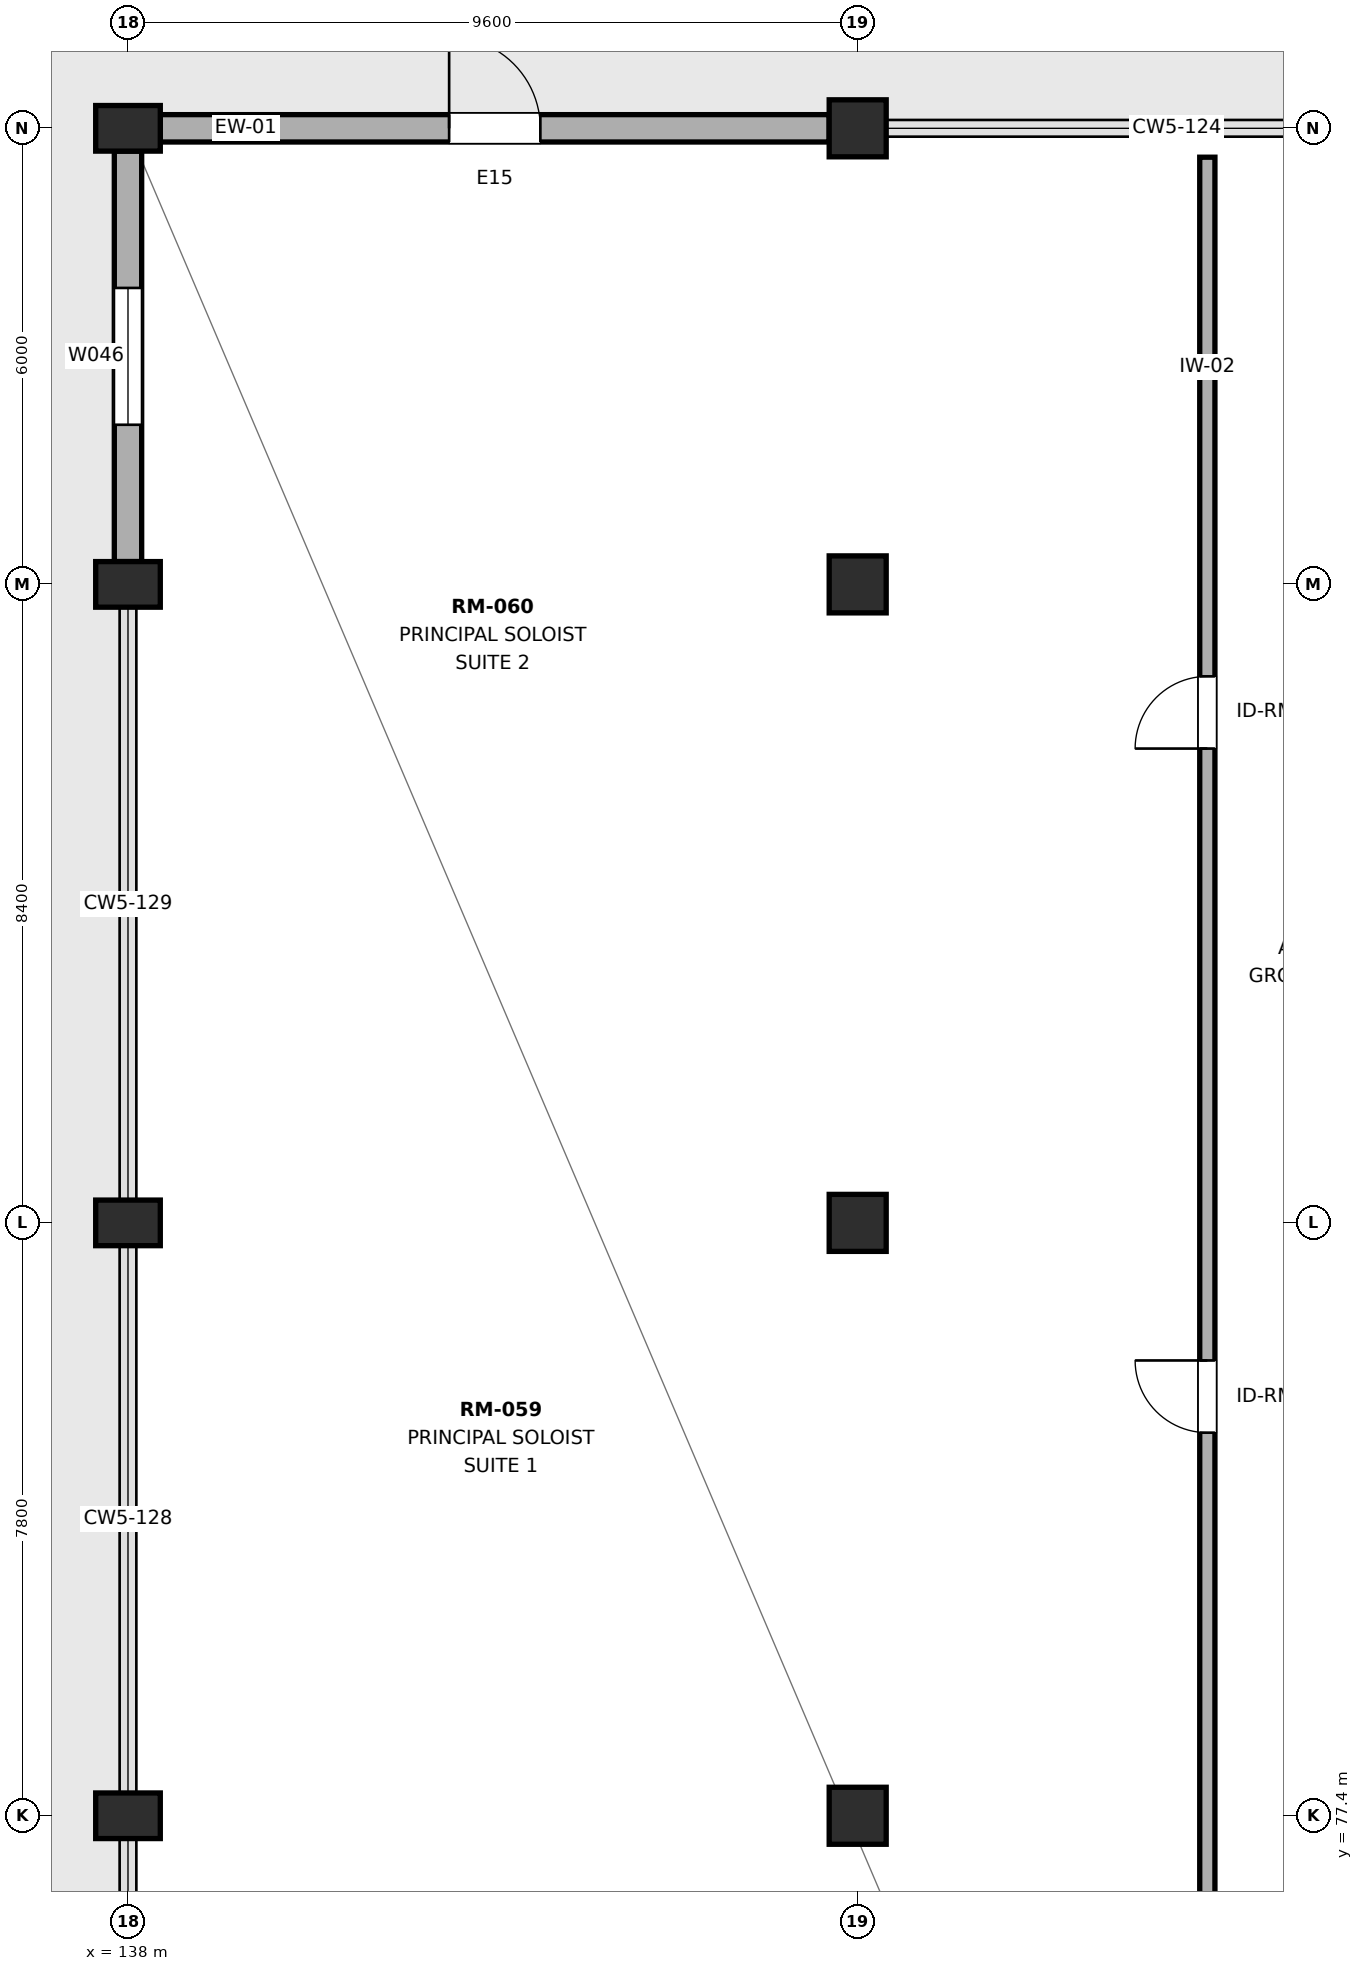
"""IFC4 building model, lengths in metres.
Left out: names, types, materials, properties, quantities, classifications, styles, units other than length and angle.
Written with IfcOpenShell. Run it as: python <this file> out.ifc"""

import sys

from ifc_helpers import new_model, si_unit, direction, frame, frame_2d, origin, origin_2d, place, context, subcontext, project, spatial, rectangle, extrude, element, fill, save


model = new_model("IFC4")
c1 = context("Model", 3, precision=1e-05, world=origin(), true_north=direction((0.0, 1.0)))
c2 = subcontext(c1, "Body", "Model", "MODEL_VIEW")
j1 = project(units=[si_unit("LENGTHUNIT", "METRE"), si_unit("PLANEANGLEUNIT", "RADIAN")], contexts=[c1])
p1 = place(None, origin())
s1 = spatial("IfcSite", under=j1, at=p1, CompositionType="ELEMENT")
p2 = place(p1, origin())
s2 = spatial("IfcBuilding", under=s1, at=p2, CompositionType="ELEMENT")
p3 = place(p2, origin())
s3 = spatial("IfcBuildingStorey", under=s2, at=p3, CompositionType="ELEMENT", Elevation=0.0)
for number, where, z_axis, x_axis in (
    (1, (138.0, 77.4, 0.0), (0.0, 0.0, 1.0), (1.0, 0.0, 0.0)),
    (2, (138.0, 85.2, 0.0), (0.0, 0.0, 1.0), (1.0, 0.0, 0.0)),
    (3, (138.0, 93.6, 0.0), (0.0, 0.0, 1.0), (1.0, 0.0, 0.0)),
    (4, (138.0, 99.6, 0.0), (0.0, 0.0, 1.0), (1.0, 0.0, 0.0)),
):
    element("IfcColumn", number, at=place(p3, frame(where, z_axis=z_axis, x_axis=x_axis)), inside=s3, PredefinedType="COLUMN", context=c2, shape_type="SweptSolid", body=[
        extrude(rectangle(XDim=0.85, YDim=0.6, at=origin_2d()), origin(), (0.0, 0.0, 1.0), 5.4),
    ])
for number, where, z_axis, x_axis in (
    (5, (147.6, 77.4, 0.0), (0.0, 0.0, 1.0), (1.0, 0.0, 0.0)),
    (6, (147.6, 85.2, 0.0), (0.0, 0.0, 1.0), (1.0, 0.0, 0.0)),
    (7, (147.6, 93.6, 0.0), (0.0, 0.0, 1.0), (1.0, 0.0, 0.0)),
    (8, (147.6, 99.6, 0.0), (0.0, 0.0, 1.0), (1.0, 0.0, 0.0)),
):
    element("IfcColumn", number, at=place(p3, frame(where, z_axis=z_axis, x_axis=x_axis)), inside=s3, PredefinedType="COLUMN", context=c2, shape_type="SweptSolid", body=[
        extrude(rectangle(XDim=0.75, YDim=0.75, at=origin_2d()), origin(), (0.0, 0.0, 1.0), 5.4),
    ])
p4 = place(p3, frame((138.425, 99.6, 0.0), z_axis=(0.0, 0.0, 1.0), x_axis=(1.0, 0.0, 0.0)))
e9 = element("IfcWall", 9, at=p4, inside=s3, PredefinedType="SOLIDWALL", context=c2, shape_type="SweptSolid", body=[
    extrude(rectangle(XDim=8.8, YDim=0.36, at=frame_2d((4.4, 0.0))), origin(), (0.0, 0.0, 1.0), 4.12),
])
p5 = place(p4, frame((3.8, 0.0, 0.0)))
e10 = element("IfcOpeningElement", 10, at=p5, cuts=e9, PredefinedType="OPENING", context=c2, shape_type="SweptSolid", body=[
    extrude(rectangle(XDim=1.2, YDim=2.3, at=frame_2d((0.6, 1.15))), frame((0.0, 0.19, 0.0), z_axis=(0.0, -1.0, 0.0), x_axis=(1.0, 0.0, 0.0)), (0.0, 0.0, 1.0), 0.38),
])
p6 = place(p3, frame((138.0, 93.9, 0.0), z_axis=(0.0, 0.0, 1.0), x_axis=(0.0, 1.0, 0.0)))
e11 = element("IfcWall", 11, at=p6, inside=s3, PredefinedType="SOLIDWALL", context=c2, shape_type="SweptSolid", body=[
    extrude(rectangle(XDim=5.4, YDim=0.36, at=frame_2d((2.7, 0.0))), origin(), (0.0, 0.0, 1.0), 4.4),
])
p7 = place(p6, frame((1.8, 0.0, 0.9)))
e12 = element("IfcOpeningElement", 12, at=p7, cuts=e11, PredefinedType="OPENING", context=c2, shape_type="SweptSolid", body=[
    extrude(rectangle(XDim=1.8, YDim=1.8, at=frame_2d((0.9, 0.9))), frame((0.0, 0.19, 0.0), z_axis=(0.0, -1.0, 0.0), x_axis=(1.0, 0.0, 0.0)), (0.0, 0.0, 1.0), 0.38),
])
p8 = place(p3, frame((152.2, 69.94, 0.0), z_axis=(0.0, 0.0, 1.0), x_axis=(0.0, 1.0, 0.0)))
e13 = element("IfcWall", 13, at=p8, inside=s3, PredefinedType="PARTITIONING", context=c2, shape_type="SweptSolid", body=[
    extrude(rectangle(XDim=29.28, YDim=0.2, at=frame_2d((14.64, 0.0))), origin(), (0.0, 0.0, 1.0), 5.09),
])
p9 = place(p8, frame((3.5, 0.0, 0.0)))
e14 = element("IfcOpeningElement", 14, at=p9, cuts=e13, PredefinedType="OPENING", context=c2, shape_type="SweptSolid", body=[
    extrude(rectangle(XDim=1.02, YDim=2.18, at=frame_2d((0.51, 1.09))), frame((0.0, 0.11, 0.0), z_axis=(0.0, -1.0, 0.0), x_axis=(1.0, 0.0, 0.0)), (0.0, 0.0, 1.0), 0.22),
])
p10 = place(p8, frame((12.5, 0.0, 0.0)))
e15 = element("IfcOpeningElement", 15, at=p10, cuts=e13, PredefinedType="OPENING", context=c2, shape_type="SweptSolid", body=[
    extrude(rectangle(XDim=0.95, YDim=2.15, at=frame_2d((0.475, 1.075))), frame((0.0, 0.11, 0.0), z_axis=(0.0, -1.0, 0.0), x_axis=(1.0, 0.0, 0.0)), (0.0, 0.0, 1.0), 0.22),
])
p11 = place(p8, frame((21.5, 0.0, 0.0)))
e16 = element("IfcOpeningElement", 16, at=p11, cuts=e13, PredefinedType="OPENING", context=c2, shape_type="SweptSolid", body=[
    extrude(rectangle(XDim=0.95, YDim=2.15, at=frame_2d((0.475, 1.075))), frame((0.0, 0.11, 0.0), z_axis=(0.0, -1.0, 0.0), x_axis=(1.0, 0.0, 0.0)), (0.0, 0.0, 1.0), 0.22),
])
p12 = place(p5, origin())
e17 = element("IfcDoor", 17, at=p12, inside=s3, OperationType="SINGLE_SWING_LEFT", PredefinedType="DOOR", context=c2, shape_type="SweptSolid", body=[
    extrude(rectangle(XDim=1.2, YDim=2.3, at=frame_2d((0.6, 1.15))), frame((0.0, 0.025, 0.0), z_axis=(0.0, -1.0, 0.0), x_axis=(1.0, 0.0, 0.0)), (0.0, 0.0, 1.0), 0.05),
])
fill(e10, e17)
p13 = place(p7, origin())
e18 = element("IfcWindow", 18, at=p13, inside=s3, PartitioningType="SINGLE_PANEL", PredefinedType="WINDOW", context=c2, shape_type="SweptSolid", body=[
    extrude(rectangle(XDim=1.8, YDim=1.8, at=frame_2d((0.9, 0.9))), frame((0.0, 0.03, 0.0), z_axis=(0.0, -1.0, 0.0), x_axis=(1.0, 0.0, 0.0)), (0.0, 0.0, 1.0), 0.06),
])
fill(e12, e18)
p14 = place(p10, origin())
e19 = element("IfcDoor", 19, at=p14, inside=s3, OperationType="SINGLE_SWING_RIGHT", PredefinedType="DOOR", context=c2, shape_type="SweptSolid", body=[
    extrude(rectangle(XDim=0.95, YDim=2.15, at=frame_2d((0.475, 1.075))), frame((0.0, 0.025, 0.0), z_axis=(0.0, -1.0, 0.0), x_axis=(1.0, 0.0, 0.0)), (0.0, 0.0, 1.0), 0.05),
])
fill(e15, e19)
p15 = place(p11, origin())
e20 = element("IfcDoor", 20, at=p15, inside=s3, OperationType="SINGLE_SWING_LEFT", PredefinedType="DOOR", context=c2, shape_type="SweptSolid", body=[
    extrude(rectangle(XDim=0.95, YDim=2.15, at=frame_2d((0.475, 1.075))), frame((0.0, 0.025, 0.0), z_axis=(0.0, -1.0, 0.0), x_axis=(1.0, 0.0, 0.0)), (0.0, 0.0, 1.0), 0.05),
])
fill(e16, e20)
save(model, sys.argv[1])
